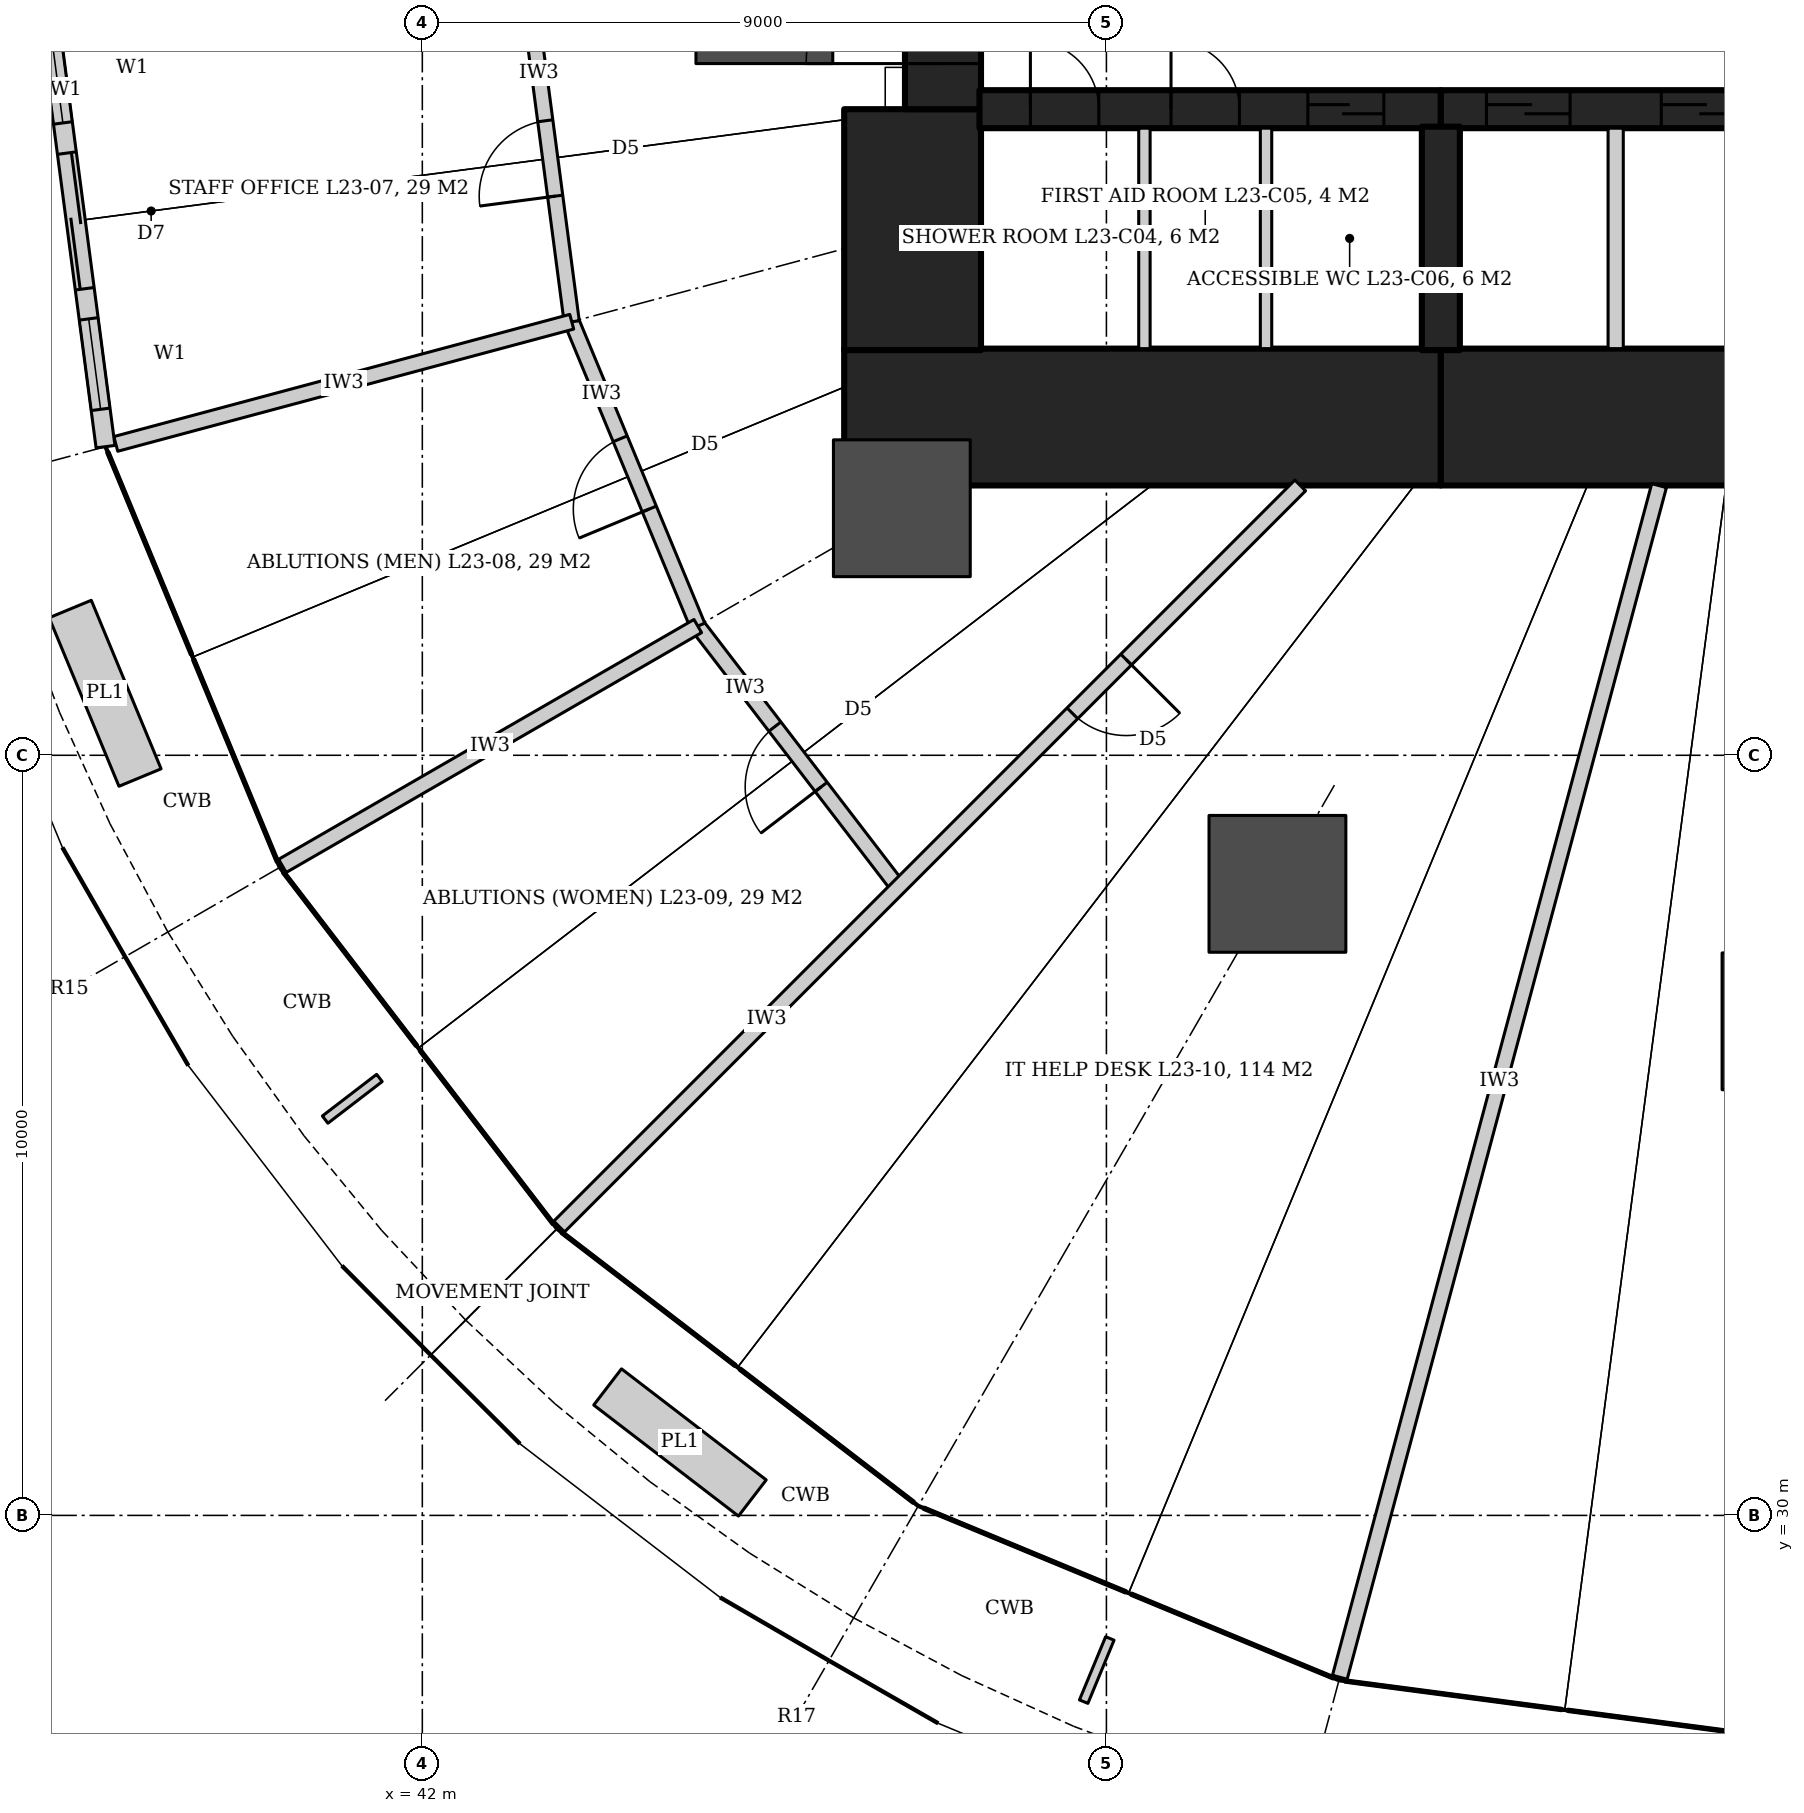
"""IFC4 building model, lengths in metres.
Left out: names, types, materials, properties, quantities, classifications, styles, units other than length and angle.
Written with IfcOpenShell. Run it as: python <this file> out.ifc"""

import sys

from ifc_helpers import new_model, si_unit, direction, frame, frame_2d, origin, origin_2d, place, context, subcontext, project, spatial, rectangle, hollow_circle, extrude, element, fill, save


model = new_model("IFC4")
c1 = context("Model", 3, precision=1e-05, world=origin(), true_north=direction((0.0, 1.0)))
c2 = subcontext(c1, "Body", "Model", "MODEL_VIEW")
j1 = project(units=[si_unit("LENGTHUNIT", "METRE"), si_unit("PLANEANGLEUNIT", "RADIAN")], contexts=[c1])
p1 = place(None, origin())
s1 = spatial("IfcSite", under=j1, at=p1, CompositionType="ELEMENT")
p2 = place(p1, origin())
s2 = spatial("IfcBuilding", under=s1, at=p2, CompositionType="ELEMENT")
p3 = place(p2, frame((0.0, 0.0, 105.8)))
s3 = spatial("IfcBuildingStorey", under=s2, at=p3, CompositionType="ELEMENT", Elevation=105.8)
p4 = place(p3, frame((47.55, 44.45, 0.0), z_axis=(0.0, 0.0, 1.0), x_axis=(1.0, 0.0, 0.0)))
e1 = element("IfcWall", 1, at=p4, inside=s3, PredefinedType="SHEAR", context=c2, shape_type="SweptSolid", body=[
    extrude(rectangle(XDim=7.85, YDim=1.8, at=frame_2d((3.925, 0.0))), origin(), (0.0, 0.0, 1.0), 4.2),
])
p5 = place(p3, frame((55.4, 44.45, 0.0), z_axis=(0.0, 0.0, 1.0), x_axis=(1.0, 0.0, 0.0)))
e2 = element("IfcWall", 2, at=p5, inside=s3, PredefinedType="SHEAR", context=c2, shape_type="SweptSolid", body=[
    extrude(rectangle(XDim=9.2, YDim=1.8, at=frame_2d((4.6, 0.0))), origin(), (0.0, 0.0, 1.0), 4.2),
])
p6 = place(p3, frame((48.45, 45.33, 0.0), z_axis=(0.0, 0.0, 1.0), x_axis=(0.0, 1.0, 0.0)))
e3 = element("IfcWall", 3, at=p6, inside=s3, PredefinedType="SHEAR", context=c2, shape_type="SweptSolid", body=[
    extrude(rectangle(XDim=3.17, YDim=1.8, at=frame_2d((1.585, 0.0))), origin(), (0.0, 0.0, 1.0), 4.2),
])
p7 = place(p3, frame((48.85, 48.5, 0.0), z_axis=(0.0, 0.0, 1.0), x_axis=(0.0, 1.0, 0.0)))
e4 = element("IfcWall", 4, at=p7, inside=s3, PredefinedType="SHEAR", context=c2, shape_type="SweptSolid", body=[
    extrude(rectangle(XDim=3.0, YDim=1.0, at=frame_2d((1.5, 0.0))), origin(), (0.0, 0.0, 1.0), 4.2),
])
p8 = place(p7, frame((0.6, 0.0, 0.0)))
e5 = element("IfcOpeningElement", 5, at=p8, cuts=e4, PredefinedType="OPENING", context=c2, shape_type="SweptSolid", body=[
    extrude(rectangle(XDim=1.8, YDim=2.1, at=frame_2d((0.9, 1.05))), frame((0.0, 0.51, 0.0), z_axis=(0.0, -1.0, 0.0), x_axis=(1.0, 0.0, 0.0)), (0.0, 0.0, 1.0), 1.02),
])
p9 = place(p3, frame((49.33, 48.5, 0.0), z_axis=(0.0, 0.0, 1.0), x_axis=(1.0, 0.0, 0.0)))
e6 = element("IfcWall", 6, at=p9, inside=s3, PredefinedType="SHEAR", context=c2, shape_type="SweptSolid", body=[
    extrude(rectangle(XDim=6.07, YDim=0.5, at=frame_2d((3.035, 0.0))), origin(), (0.0, 0.0, 1.0), 4.2),
])
p10 = place(p9, frame((0.67, 0.0, 0.0)))
e7 = element("IfcOpeningElement", 7, at=p10, cuts=e6, PredefinedType="OPENING", context=c2, shape_type="SweptSolid", body=[
    extrude(rectangle(XDim=0.9, YDim=2.1, at=frame_2d((0.45, 1.05))), frame((0.0, 0.26, 0.0), z_axis=(0.0, -1.0, 0.0), x_axis=(1.0, 0.0, 0.0)), (0.0, 0.0, 1.0), 0.52),
])
p11 = place(p9, frame((2.52, 0.0, 0.0)))
e8 = element("IfcOpeningElement", 8, at=p11, cuts=e6, PredefinedType="OPENING", context=c2, shape_type="SweptSolid", body=[
    extrude(rectangle(XDim=0.9, YDim=2.1, at=frame_2d((0.45, 1.05))), frame((0.0, 0.26, 0.0), z_axis=(0.0, -1.0, 0.0), x_axis=(1.0, 0.0, 0.0)), (0.0, 0.0, 1.0), 0.52),
])
p12 = place(p9, frame((4.32, 0.0, 0.0)))
e9 = element("IfcOpeningElement", 9, at=p12, cuts=e6, PredefinedType="OPENING", context=c2, shape_type="SweptSolid", body=[
    extrude(rectangle(XDim=1.0, YDim=2.1, at=frame_2d((0.5, 1.05))), frame((0.0, 0.26, 0.0), z_axis=(0.0, -1.0, 0.0), x_axis=(1.0, 0.0, 0.0)), (0.0, 0.0, 1.0), 0.52),
])
p13 = place(p3, frame((55.4, 48.5, 0.0), z_axis=(0.0, 0.0, 1.0), x_axis=(1.0, 0.0, 0.0)))
e10 = element("IfcWall", 10, at=p13, inside=s3, PredefinedType="SHEAR", context=c2, shape_type="SweptSolid", body=[
    extrude(rectangle(XDim=9.2, YDim=0.5, at=frame_2d((4.6, 0.0))), origin(), (0.0, 0.0, 1.0), 4.2),
])
p14 = place(p13, frame((0.6, 0.0, 0.0)))
e11 = element("IfcOpeningElement", 11, at=p14, cuts=e10, PredefinedType="OPENING", context=c2, shape_type="SweptSolid", body=[
    extrude(rectangle(XDim=1.1, YDim=2.1, at=frame_2d((0.55, 1.05))), frame((0.0, 0.26, 0.0), z_axis=(0.0, -1.0, 0.0), x_axis=(1.0, 0.0, 0.0)), (0.0, 0.0, 1.0), 0.52),
])
p15 = place(p13, frame((2.9, 0.0, 0.0)))
e12 = element("IfcOpeningElement", 12, at=p15, cuts=e10, PredefinedType="OPENING", context=c2, shape_type="SweptSolid", body=[
    extrude(rectangle(XDim=1.1, YDim=2.1, at=frame_2d((0.55, 1.05))), frame((0.0, 0.26, 0.0), z_axis=(0.0, -1.0, 0.0), x_axis=(1.0, 0.0, 0.0)), (0.0, 0.0, 1.0), 0.52),
])
p16 = place(p13, frame((5.2, 0.0, 0.0)))
e13 = element("IfcOpeningElement", 13, at=p16, cuts=e10, PredefinedType="OPENING", context=c2, shape_type="SweptSolid", body=[
    extrude(rectangle(XDim=1.1, YDim=2.1, at=frame_2d((0.55, 1.05))), frame((0.0, 0.26, 0.0), z_axis=(0.0, -1.0, 0.0), x_axis=(1.0, 0.0, 0.0)), (0.0, 0.0, 1.0), 0.52),
])
p17 = place(p13, frame((7.5, 0.0, 0.0)))
e14 = element("IfcOpeningElement", 14, at=p17, cuts=e10, PredefinedType="OPENING", context=c2, shape_type="SweptSolid", body=[
    extrude(rectangle(XDim=1.1, YDim=2.1, at=frame_2d((0.55, 1.05))), frame((0.0, 0.26, 0.0), z_axis=(0.0, -1.0, 0.0), x_axis=(1.0, 0.0, 0.0)), (0.0, 0.0, 1.0), 0.52),
])
p18 = place(p3, frame((55.4, 48.27, 0.0), z_axis=(0.0, 0.0, 1.0), x_axis=(0.0, -1.0, 0.0)))
e15 = element("IfcWall", 15, at=p18, inside=s3, PredefinedType="SHEAR", context=c2, shape_type="SweptSolid", body=[
    extrude(rectangle(XDim=2.94, YDim=0.5, at=frame_2d((1.47, 0.0))), origin(), (0.0, 0.0, 1.0), 4.2),
])
for number, where, z_axis, x_axis in (
    (16, (46.5, 50.0, 0.0), (0.0, 0.0, 1.0), (1.0, 0.0, 0.0)),
    (17, (48.309, 43.25, 0.0), (0.0, 0.0, 1.0), (1.0, 0.0, 0.0)),
    (18, (53.25, 38.309, 0.0), (0.0, 0.0, 1.0), (1.0, 0.0, 0.0)),
    (19, (60.0, 36.5, 0.0), (0.0, 0.0, 1.0), (1.0, 0.0, 0.0)),
):
    element("IfcColumn", number, at=place(p3, frame(where, z_axis=z_axis, x_axis=x_axis)), inside=s3, PredefinedType="COLUMN", context=c2, shape_type="SweptSolid", body=[
        extrude(hollow_circle(Radius=0.9, WallThickness=0.09, at=origin_2d()), origin(), (0.0, 0.0, 1.0), 4.2),
    ])
p19 = place(p3, frame((48.262, 38.262, 0.0), z_axis=(0.0, 0.0, 1.0), x_axis=(-0.60874374674, 0.79336690806, 0.0)))
e20 = element("IfcWall", 20, at=p19, inside=s3, PredefinedType="PARTITIONING", context=c2, shape_type="SweptSolid", body=[
    extrude(rectangle(XDim=4.333, YDim=0.2, at=frame_2d((2.167, 0.0))), origin(), (0.0, 0.0, 1.0), 3.04),
])
p20 = place(p19, frame((1.667, 0.0, 0.0)))
e21 = element("IfcOpeningElement", 21, at=p20, cuts=e20, PredefinedType="OPENING", context=c2, shape_type="SweptSolid", body=[
    extrude(rectangle(XDim=1.0, YDim=2.1, at=frame_2d((0.5, 1.05))), frame((0.0, 0.11, 0.0), z_axis=(0.0, -1.0, 0.0), x_axis=(1.0, 0.0, 0.0)), (0.0, 0.0, 1.0), 0.22),
])
p21 = place(p3, frame((45.624, 41.7, 0.0), z_axis=(0.0, 0.0, 1.0), x_axis=(-0.382698425325, 0.923873322082, 0.0)))
e22 = element("IfcWall", 22, at=p21, inside=s3, PredefinedType="PARTITIONING", context=c2, shape_type="SweptSolid", body=[
    extrude(rectangle(XDim=4.333, YDim=0.2, at=frame_2d((2.167, 0.0))), origin(), (0.0, 0.0, 1.0), 3.04),
])
p22 = place(p21, frame((1.667, 0.0, 0.0)))
e23 = element("IfcOpeningElement", 23, at=p22, cuts=e22, PredefinedType="OPENING", context=c2, shape_type="SweptSolid", body=[
    extrude(rectangle(XDim=1.0, YDim=2.1, at=frame_2d((0.5, 1.05))), frame((0.0, 0.11, 0.0), z_axis=(0.0, -1.0, 0.0), x_axis=(1.0, 0.0, 0.0)), (0.0, 0.0, 1.0), 0.22),
])
p23 = place(p3, frame((43.966, 45.704, 0.0), z_axis=(0.0, 0.0, 1.0), x_axis=(-0.130536124221, 0.99144355375, 0.0)))
e24 = element("IfcWall", 24, at=p23, inside=s3, PredefinedType="PARTITIONING", context=c2, shape_type="SweptSolid", body=[
    extrude(rectangle(XDim=4.333, YDim=0.2, at=frame_2d((2.167, 0.0))), origin(), (0.0, 0.0, 1.0), 3.04),
])
p24 = place(p23, frame((1.667, 0.0, 0.0)))
e25 = element("IfcOpeningElement", 25, at=p24, cuts=e24, PredefinedType="OPENING", context=c2, shape_type="SweptSolid", body=[
    extrude(rectangle(XDim=1.0, YDim=2.1, at=frame_2d((0.5, 1.05))), frame((0.0, 0.11, 0.0), z_axis=(0.0, -1.0, 0.0), x_axis=(1.0, 0.0, 0.0)), (0.0, 0.0, 1.0), 0.22),
])
p25 = place(p3, frame((43.966, 45.704, 0.0), z_axis=(0.0, 0.0, 1.0), x_axis=(-0.965918392585, -0.25884678647, 0.0)))
e26 = element("IfcWall", 26, at=p25, inside=s3, PredefinedType="PARTITIONING", context=c2, shape_type="SweptSolid", body=[
    extrude(rectangle(XDim=6.21, YDim=0.2, at=frame_2d((3.105, 0.0))), origin(), (0.0, 0.0, 1.0), 3.04),
])
p26 = place(p3, frame((45.624, 41.7, 0.0), z_axis=(0.0, 0.0, 1.0), x_axis=(-0.866022573651, -0.500004901903, 0.0)))
e27 = element("IfcWall", 27, at=p26, inside=s3, PredefinedType="PARTITIONING", context=c2, shape_type="SweptSolid", body=[
    extrude(rectangle(XDim=6.31, YDim=0.2, at=frame_2d((3.155, 0.0))), origin(), (0.0, 0.0, 1.0), 3.04),
])
p27 = place(p3, frame((53.55, 43.55, 0.0), z_axis=(0.0, 0.0, 1.0), x_axis=(-0.707106781187, -0.707106781187, 0.0)))
e28 = element("IfcWall", 28, at=p27, inside=s3, PredefinedType="PARTITIONING", context=c2, shape_type="SweptSolid", body=[
    extrude(rectangle(XDim=13.788, YDim=0.2, at=frame_2d((6.894, 0.0))), origin(), (0.0, 0.0, 1.0), 3.02),
])
p28 = place(p27, frame((3.239, 0.0, 0.0)))
e29 = element("IfcOpeningElement", 29, at=p28, cuts=e28, PredefinedType="OPENING", context=c2, shape_type="SweptSolid", body=[
    extrude(rectangle(XDim=1.0, YDim=2.1, at=frame_2d((0.5, 1.05))), frame((0.0, 0.11, 0.0), z_axis=(0.0, -1.0, 0.0), x_axis=(1.0, 0.0, 0.0)), (0.0, 0.0, 1.0), 0.22),
])
p29 = place(p3, frame((58.271, 43.548, 0.0), z_axis=(0.0, 0.0, 1.0), x_axis=(-0.258807515492, -0.965928915565, 0.0)))
e30 = element("IfcWall", 30, at=p29, inside=s3, PredefinedType="PARTITIONING", context=c2, shape_type="SweptSolid", body=[
    extrude(rectangle(XDim=16.23, YDim=0.2, at=frame_2d((8.115, 0.0))), origin(), (0.0, 0.0, 1.0), 3.02),
])
p30 = place(p3, frame((37.05, 50.0, 0.0), z_axis=(0.0, 0.0, 1.0), x_axis=(0.130521975708, -0.991445416479, 0.0)))
e31 = element("IfcWall", 31, at=p30, inside=s3, PredefinedType="SOLIDWALL", context=c2, shape_type="SweptSolid", body=[
    extrude(rectangle(XDim=5.991, YDim=0.25, at=frame_2d((2.996, 0.0))), origin(), (0.0, 0.0, 1.0), 4.04),
])
p31 = place(p30, frame((2.095, 0.0, 0.0)))
e32 = element("IfcOpeningElement", 32, at=p31, cuts=e31, PredefinedType="OPENING", context=c2, shape_type="SweptSolid", body=[
    extrude(rectangle(XDim=1.8, YDim=2.4, at=frame_2d((0.9, 1.2))), frame((0.0, 0.135, 0.0), z_axis=(0.0, -1.0, 0.0), x_axis=(1.0, 0.0, 0.0)), (0.0, 0.0, 1.0), 0.27),
])
p32 = place(p30, frame((0.496, 0.0, 0.0)))
e33 = element("IfcOpeningElement", 33, at=p32, cuts=e31, PredefinedType="OPENING", context=c2, shape_type="SweptSolid", body=[
    extrude(rectangle(XDim=1.2, YDim=2.4, at=frame_2d((0.6, 1.2))), frame((0.0, 0.135, 0.0), z_axis=(0.0, -1.0, 0.0), x_axis=(1.0, 0.0, 0.0)), (0.0, 0.0, 1.0), 0.27),
])
p33 = place(p30, frame((4.296, 0.0, 0.0)))
e34 = element("IfcOpeningElement", 34, at=p33, cuts=e31, PredefinedType="OPENING", context=c2, shape_type="SweptSolid", body=[
    extrude(rectangle(XDim=1.2, YDim=2.4, at=frame_2d((0.6, 1.2))), frame((0.0, 0.135, 0.0), z_axis=(0.0, -1.0, 0.0), x_axis=(1.0, 0.0, 0.0)), (0.0, 0.0, 1.0), 0.27),
])
p34 = place(p3, frame((57.7, 45.35, 0.0), z_axis=(0.0, 0.0, 1.0), x_axis=(0.0, 1.0, 0.0)))
e35 = element("IfcWall", 35, at=p34, inside=s3, PredefinedType="PARTITIONING", context=c2, shape_type="SweptSolid", body=[
    extrude(rectangle(XDim=2.9, YDim=0.2, at=frame_2d((1.45, 0.0))), origin(), (0.0, 0.0, 1.0), 4.2),
])
for number, where, z_axis, x_axis in (
    (36, (51.5, 45.35, 0.0), (0.0, 0.0, 1.0), (0.0, 1.0, 0.0)),
    (37, (53.1, 45.35, 0.0), (0.0, 0.0, 1.0), (0.0, 1.0, 0.0)),
):
    element("IfcWall", number, at=place(p3, frame(where, z_axis=z_axis, x_axis=x_axis)), inside=s3, PredefinedType="PARTITIONING", context=c2, shape_type="SweptSolid", body=[
        extrude(rectangle(XDim=2.9, YDim=0.15, at=frame_2d((1.45, 0.0))), origin(), (0.0, 0.0, 1.0), 4.04),
    ])
p35 = place(p24, origin())
e38 = element("IfcDoor", 38, at=p35, inside=s3, OperationType="SINGLE_SWING_LEFT", PredefinedType="DOOR", context=c2, shape_type="SweptSolid", body=[
    extrude(rectangle(XDim=1.0, YDim=2.1, at=frame_2d((0.5, 1.05))), frame((0.0, 0.025, 0.0), z_axis=(0.0, -1.0, 0.0), x_axis=(1.0, 0.0, 0.0)), (0.0, 0.0, 1.0), 0.05),
])
fill(e25, e38)
p36 = place(p22, origin())
e39 = element("IfcDoor", 39, at=p36, inside=s3, OperationType="SINGLE_SWING_LEFT", PredefinedType="DOOR", context=c2, shape_type="SweptSolid", body=[
    extrude(rectangle(XDim=1.0, YDim=2.1, at=frame_2d((0.5, 1.05))), frame((0.0, 0.025, 0.0), z_axis=(0.0, -1.0, 0.0), x_axis=(1.0, 0.0, 0.0)), (0.0, 0.0, 1.0), 0.05),
])
fill(e23, e39)
p37 = place(p20, origin())
e40 = element("IfcDoor", 40, at=p37, inside=s3, OperationType="SINGLE_SWING_LEFT", PredefinedType="DOOR", context=c2, shape_type="SweptSolid", body=[
    extrude(rectangle(XDim=1.0, YDim=2.1, at=frame_2d((0.5, 1.05))), frame((0.0, 0.025, 0.0), z_axis=(0.0, -1.0, 0.0), x_axis=(1.0, 0.0, 0.0)), (0.0, 0.0, 1.0), 0.05),
])
fill(e21, e40)
p38 = place(p28, origin())
e41 = element("IfcDoor", 41, at=p38, inside=s3, OperationType="SINGLE_SWING_LEFT", PredefinedType="DOOR", context=c2, shape_type="SweptSolid", body=[
    extrude(rectangle(XDim=1.0, YDim=2.1, at=frame_2d((0.5, 1.05))), frame((0.0, 0.025, 0.0), z_axis=(0.0, -1.0, 0.0), x_axis=(1.0, 0.0, 0.0)), (0.0, 0.0, 1.0), 0.05),
])
fill(e29, e41)
p39 = place(p31, origin())
e42 = element("IfcDoor", 42, at=p39, inside=s3, OperationType="DOUBLE_DOOR_SLIDING", PredefinedType="DOOR", context=c2, shape_type="SweptSolid", body=[
    extrude(rectangle(XDim=1.8, YDim=2.4, at=frame_2d((0.9, 1.2))), frame((0.0, 0.025, 0.0), z_axis=(0.0, -1.0, 0.0), x_axis=(1.0, 0.0, 0.0)), (0.0, 0.0, 1.0), 0.05),
])
fill(e32, e42)
p40 = place(p32, origin())
e43 = element("IfcWindow", 43, at=p40, inside=s3, PartitioningType="SINGLE_PANEL", PredefinedType="WINDOW", context=c2, shape_type="SweptSolid", body=[
    extrude(rectangle(XDim=1.2, YDim=2.4, at=frame_2d((0.6, 1.2))), frame((0.0, 0.03, 0.0), z_axis=(0.0, -1.0, 0.0), x_axis=(1.0, 0.0, 0.0)), (0.0, 0.0, 1.0), 0.06),
])
fill(e33, e43)
p41 = place(p33, origin())
e44 = element("IfcWindow", 44, at=p41, inside=s3, PartitioningType="SINGLE_PANEL", PredefinedType="WINDOW", context=c2, shape_type="SweptSolid", body=[
    extrude(rectangle(XDim=1.2, YDim=2.4, at=frame_2d((0.6, 1.2))), frame((0.0, 0.03, 0.0), z_axis=(0.0, -1.0, 0.0), x_axis=(1.0, 0.0, 0.0)), (0.0, 0.0, 1.0), 0.06),
])
fill(e34, e44)
p42 = place(p14, origin())
e45 = element("IfcDoor", 45, at=p42, inside=s3, OperationType="SLIDING_TO_LEFT", PredefinedType="DOOR", context=c2, shape_type="SweptSolid", body=[
    extrude(rectangle(XDim=1.1, YDim=2.1, at=frame_2d((0.55, 1.05))), frame((0.0, 0.025, 0.0), z_axis=(0.0, -1.0, 0.0), x_axis=(1.0, 0.0, 0.0)), (0.0, 0.0, 1.0), 0.05),
])
fill(e11, e45)
p43 = place(p15, origin())
e46 = element("IfcDoor", 46, at=p43, inside=s3, OperationType="SLIDING_TO_LEFT", PredefinedType="DOOR", context=c2, shape_type="SweptSolid", body=[
    extrude(rectangle(XDim=1.1, YDim=2.1, at=frame_2d((0.55, 1.05))), frame((0.0, 0.025, 0.0), z_axis=(0.0, -1.0, 0.0), x_axis=(1.0, 0.0, 0.0)), (0.0, 0.0, 1.0), 0.05),
])
fill(e12, e46)
p44 = place(p10, origin())
e47 = element("IfcDoor", 47, at=p44, inside=s3, OperationType="SINGLE_SWING_RIGHT", PredefinedType="DOOR", context=c2, shape_type="SweptSolid", body=[
    extrude(rectangle(XDim=0.9, YDim=2.1, at=frame_2d((0.45, 1.05))), frame((0.0, 0.025, 0.0), z_axis=(0.0, -1.0, 0.0), x_axis=(1.0, 0.0, 0.0)), (0.0, 0.0, 1.0), 0.05),
])
fill(e7, e47)
p45 = place(p11, origin())
e48 = element("IfcDoor", 48, at=p45, inside=s3, OperationType="SINGLE_SWING_RIGHT", PredefinedType="DOOR", context=c2, shape_type="SweptSolid", body=[
    extrude(rectangle(XDim=0.9, YDim=2.1, at=frame_2d((0.45, 1.05))), frame((0.0, 0.025, 0.0), z_axis=(0.0, -1.0, 0.0), x_axis=(1.0, 0.0, 0.0)), (0.0, 0.0, 1.0), 0.05),
])
fill(e8, e48)
p46 = place(p12, origin())
e49 = element("IfcDoor", 49, at=p46, inside=s3, OperationType="SLIDING_TO_LEFT", PredefinedType="DOOR", context=c2, shape_type="SweptSolid", body=[
    extrude(rectangle(XDim=1.0, YDim=2.1, at=frame_2d((0.5, 1.05))), frame((0.0, 0.025, 0.0), z_axis=(0.0, -1.0, 0.0), x_axis=(1.0, 0.0, 0.0)), (0.0, 0.0, 1.0), 0.05),
])
fill(e9, e49)
p47 = place(p8, origin())
e50 = element("IfcDoor", 50, at=p47, inside=s3, OperationType="DOUBLE_DOOR_DOUBLE_SWING", PredefinedType="DOOR", context=c2, shape_type="SweptSolid", body=[
    extrude(rectangle(XDim=1.8, YDim=2.1, at=frame_2d((0.9, 1.05))), frame((0.0, 0.025, 0.0), z_axis=(0.0, -1.0, 0.0), x_axis=(1.0, 0.0, 0.0)), (0.0, 0.0, 1.0), 0.05),
])
fill(e5, e50)
save(model, sys.argv[1])
